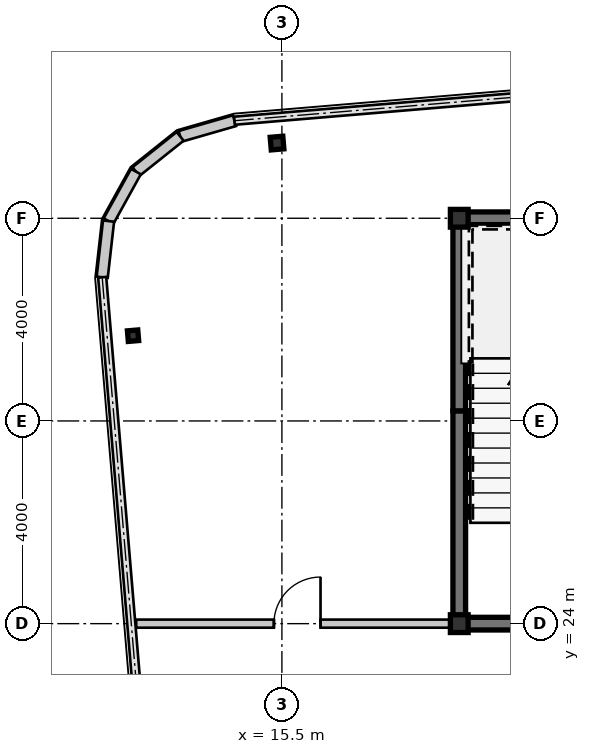
"""IFC4 building model, lengths in metres.
Left out: names, types, materials, properties, quantities, classifications, styles, units other than length and angle.
Written with IfcOpenShell. Run it as: python <this file> out.ifc"""

import sys

from ifc_helpers import new_model, si_unit, direction, frame, frame_2d, origin, origin_2d, place, context, subcontext, project, spatial, rectangle, hollow_rectangle, i_section, extrude, source, transform, mapped, element, fill, save


model = new_model("IFC4")
c1 = context("Model", 3, precision=1e-05, world=origin(), true_north=direction((0.0, 1.0)))
c2 = subcontext(c1, "Body", "Model", "MODEL_VIEW")
j1 = project(units=[si_unit("LENGTHUNIT", "METRE"), si_unit("PLANEANGLEUNIT", "RADIAN")], contexts=[c1])
p1 = place(None, origin())
s1 = spatial("IfcSite", under=j1, at=p1, CompositionType="ELEMENT")
p2 = place(p1, origin())
s2 = spatial("IfcBuilding", under=s1, at=p2, CompositionType="ELEMENT")
p3 = place(p2, frame((0.0, 0.0, 178.85)))
s3 = spatial("IfcBuildingStorey", under=s2, at=p3, CompositionType="ELEMENT", Elevation=178.85)
m1 = source(origin(), c2, "Body", "SweptSolid", [
    extrude(hollow_rectangle(XDim=0.35, YDim=0.35, WallThickness=0.016, at=origin_2d()), origin(), (0.0, 0.0, 1.0), 3.15),
])
for number, where, z_axis, x_axis in (
    (1, (19.0, 24.0, 0.0), (0.0, 0.0, 1.0), (1.0, 0.0, 0.0)),
    (2, (19.0, 32.0, 0.0), (0.0, 0.0, 1.0), (1.0, 0.0, 0.0)),
):
    element("IfcColumn", number, at=place(p3, frame(where, z_axis=z_axis, x_axis=x_axis)), inside=s3, PredefinedType="COLUMN", context=c2, shape_type="MappedRepresentation", body=[
        mapped(m1, transform((0.0, 0.0, 0.0), scale=1.0)),
    ])
m2 = source(origin(), c2, "Body", "SweptSolid", [
    extrude(hollow_rectangle(XDim=0.25, YDim=0.25, WallThickness=0.01, at=origin_2d()), origin(), (0.0, 0.0, 1.0), 3.15),
])
p4 = place(p3, frame((15.404, 33.484, 0.0), z_axis=(0.0, 0.0, 1.0), x_axis=(0.99649285925, 0.083677843332, 0.0)))
e3 = element("IfcColumn", 3, at=p4, inside=s3, PredefinedType="COLUMN", context=c2, shape_type="MappedRepresentation", body=[
    mapped(m2, transform((0.0, 0.0, 0.0), scale=1.0)),
])
m3 = source(origin(), c2, "Body", "SweptSolid", [
    extrude(i_section(OverallWidth=0.205, OverallDepth=0.21, WebThickness=0.009, FlangeThickness=0.014, at=origin_2d()), origin(), (0.0, 0.0, 1.0), 3.15),
])
p5 = place(p3, frame((12.562, 29.682, 0.0), z_axis=(0.0, 0.0, 1.0), x_axis=(0.99649285925, 0.083677843332, 0.0)))
e4 = element("IfcColumn", 4, at=p5, inside=s3, PredefinedType="COLUMN", context=c2, shape_type="MappedRepresentation", body=[
    mapped(m3, transform((0.0, 0.0, 0.0), scale=1.0)),
])
m4 = source(origin(), c2, "Body", "SweptSolid", [
    extrude(rectangle(XDim=1.116, YDim=0.22, at=frame_2d((0.558, 0.0))), origin(), (0.0, 0.0, 1.0), 2.93),
])
p6 = place(p3, frame((14.564, 33.925, 0.0), z_axis=(0.0, 0.0, 1.0), x_axis=(-0.961010464297, -0.276512002475, 0.0)))
e5 = element("IfcWall", 5, at=p6, inside=s3, PredefinedType="SOLIDWALL", context=c2, shape_type="MappedRepresentation", body=[
    mapped(m4, transform((0.0, 0.0, 0.0), scale=1.0)),
])
m5 = source(origin(), c2, "Body", "SweptSolid", [
    extrude(rectangle(XDim=1.116, YDim=0.22, at=frame_2d((0.558, 0.0))), origin(), (0.0, 0.0, 1.0), 2.93),
])
p7 = place(p3, frame((13.491, 33.616, 0.0), z_axis=(0.0, 0.0, 1.0), x_axis=(-0.782062884215, -0.623199522732, 0.0)))
e6 = element("IfcWall", 6, at=p7, inside=s3, PredefinedType="SOLIDWALL", context=c2, shape_type="MappedRepresentation", body=[
    mapped(m5, transform((0.0, 0.0, 0.0), scale=1.0)),
])
for number, where, z_axis, x_axis in (
    (7, (12.619, 32.921, 0.0), (0.0, 0.0, 1.0), (-0.484, -0.875, 0.0)),
    (8, (12.079, 31.944, 0.0), (0.0, 0.0, 1.0), (-0.112, -0.994, 0.0)),
):
    element("IfcWall", number, at=place(p3, frame(where, z_axis=z_axis, x_axis=x_axis)), inside=s3, PredefinedType="SOLIDWALL", context=c2, shape_type="MappedRepresentation", body=[
        mapped(m4, transform((0.0, 0.0, 0.0), scale=1.0)),
    ])
m6 = source(origin(), c2, "Body", "SweptSolid", [
    extrude(rectangle(XDim=9.125, YDim=0.25, at=frame_2d((4.562, 0.0))), origin(), (0.0, 0.0, 1.0), 2.93),
])
p8 = place(p3, frame((18.875, 32.0, 0.0), z_axis=(0.0, 0.0, 1.0), x_axis=(1.0, 0.0, 0.0)))
e9 = element("IfcWall", 9, at=p8, inside=s3, PredefinedType="SHEAR", context=c2, shape_type="MappedRepresentation", body=[
    mapped(m6, transform((0.0, 0.0, 0.0), scale=1.0)),
])
m7 = source(origin(), c2, "Body", "SweptSolid", [
    extrude(rectangle(XDim=4.075, YDim=0.25, at=frame_2d((2.038, 0.0))), origin(), (0.0, 0.0, 1.0), 2.93),
])
p9 = place(p3, frame((19.0, 24.125, 0.0), z_axis=(0.0, 0.0, 1.0), x_axis=(0.0, 1.0, 0.0)))
e10 = element("IfcWall", 10, at=p9, inside=s3, PredefinedType="SHEAR", context=c2, shape_type="MappedRepresentation", body=[
    mapped(m7, transform((0.0, 0.0, 0.0), scale=1.0)),
])
m8 = source(origin(), c2, "Body", "SweptSolid", [
    extrude(rectangle(XDim=3.675, YDim=0.25, at=frame_2d((1.837, 0.0))), origin(), (0.0, 0.0, 1.0), 2.93),
])
p10 = place(p3, frame((19.0, 28.2, 0.0), z_axis=(0.0, 0.0, 1.0), x_axis=(0.0, 1.0, 0.0)))
e11 = element("IfcWall", 11, at=p10, inside=s3, PredefinedType="SHEAR", context=c2, shape_type="MappedRepresentation", body=[
    mapped(m8, transform((0.0, 0.0, 0.0), scale=1.0)),
])
m9 = source(origin(), c2, "Body", "SweptSolid", [
    extrude(rectangle(XDim=4.85, YDim=0.25, at=frame_2d((2.425, 0.0))), origin(), (0.0, 0.0, 1.0), 2.93),
])
p11 = place(p3, frame((18.875, 24.0, 0.0), z_axis=(0.0, 0.0, 1.0), x_axis=(1.0, 0.0, 0.0)))
e12 = element("IfcWall", 12, at=p11, inside=s3, PredefinedType="SHEAR", context=c2, shape_type="MappedRepresentation", body=[
    mapped(m9, transform((0.0, 0.0, 0.0), scale=1.0)),
])
m10 = source(origin(), c2, "Body", "SweptSolid", [
    extrude(rectangle(XDim=6.251, YDim=0.16, at=frame_2d((3.125, 0.0))), origin(), (0.0, 0.0, 1.0), 2.93),
])
p12 = place(p3, frame((12.624, 24.0, 0.0), z_axis=(0.0, 0.0, 1.0), x_axis=(1.0, 0.0, 0.0)))
e13 = element("IfcWall", 13, at=p12, inside=s3, PredefinedType="PARTITIONING", context=c2, shape_type="MappedRepresentation", body=[
    mapped(m10, transform((0.0, 0.0, 0.0), scale=1.0)),
])
m11 = source(origin(), c2, "Body", "SweptSolid", [
    extrude(rectangle(XDim=0.92, YDim=2.1, at=frame_2d((0.46, 1.05))), frame((0.0, 0.09, 0.0), z_axis=(0.0, -1.0, 0.0), x_axis=(1.0, 0.0, 0.0)), (0.0, 0.0, 1.0), 0.18),
])
p13 = place(p12, frame((2.718, 0.0, 0.0)))
e14 = element("IfcOpeningElement", 14, at=p13, cuts=e13, PredefinedType="OPENING", context=c2, shape_type="MappedRepresentation", body=[
    mapped(m11, transform((0.0, 0.0, 0.0), scale=1.0)),
])
m12 = source(origin(), c2, "Body", "SweptSolid", [
    extrude(rectangle(XDim=0.92, YDim=2.1, at=frame_2d((0.46, 1.05))), frame((0.0, 0.025, 0.0), z_axis=(0.0, -1.0, 0.0), x_axis=(1.0, 0.0, 0.0)), (0.0, 0.0, 1.0), 0.05),
])
p14 = place(p13, origin())
e15 = element("IfcDoor", 15, at=p14, inside=s3, OperationType="SINGLE_SWING_RIGHT", PredefinedType="DOOR", context=c2, shape_type="MappedRepresentation", body=[
    mapped(m12, transform((0.0, 0.0, 0.0), scale=1.0)),
])
fill(e14, e15)
save(model, sys.argv[1])
